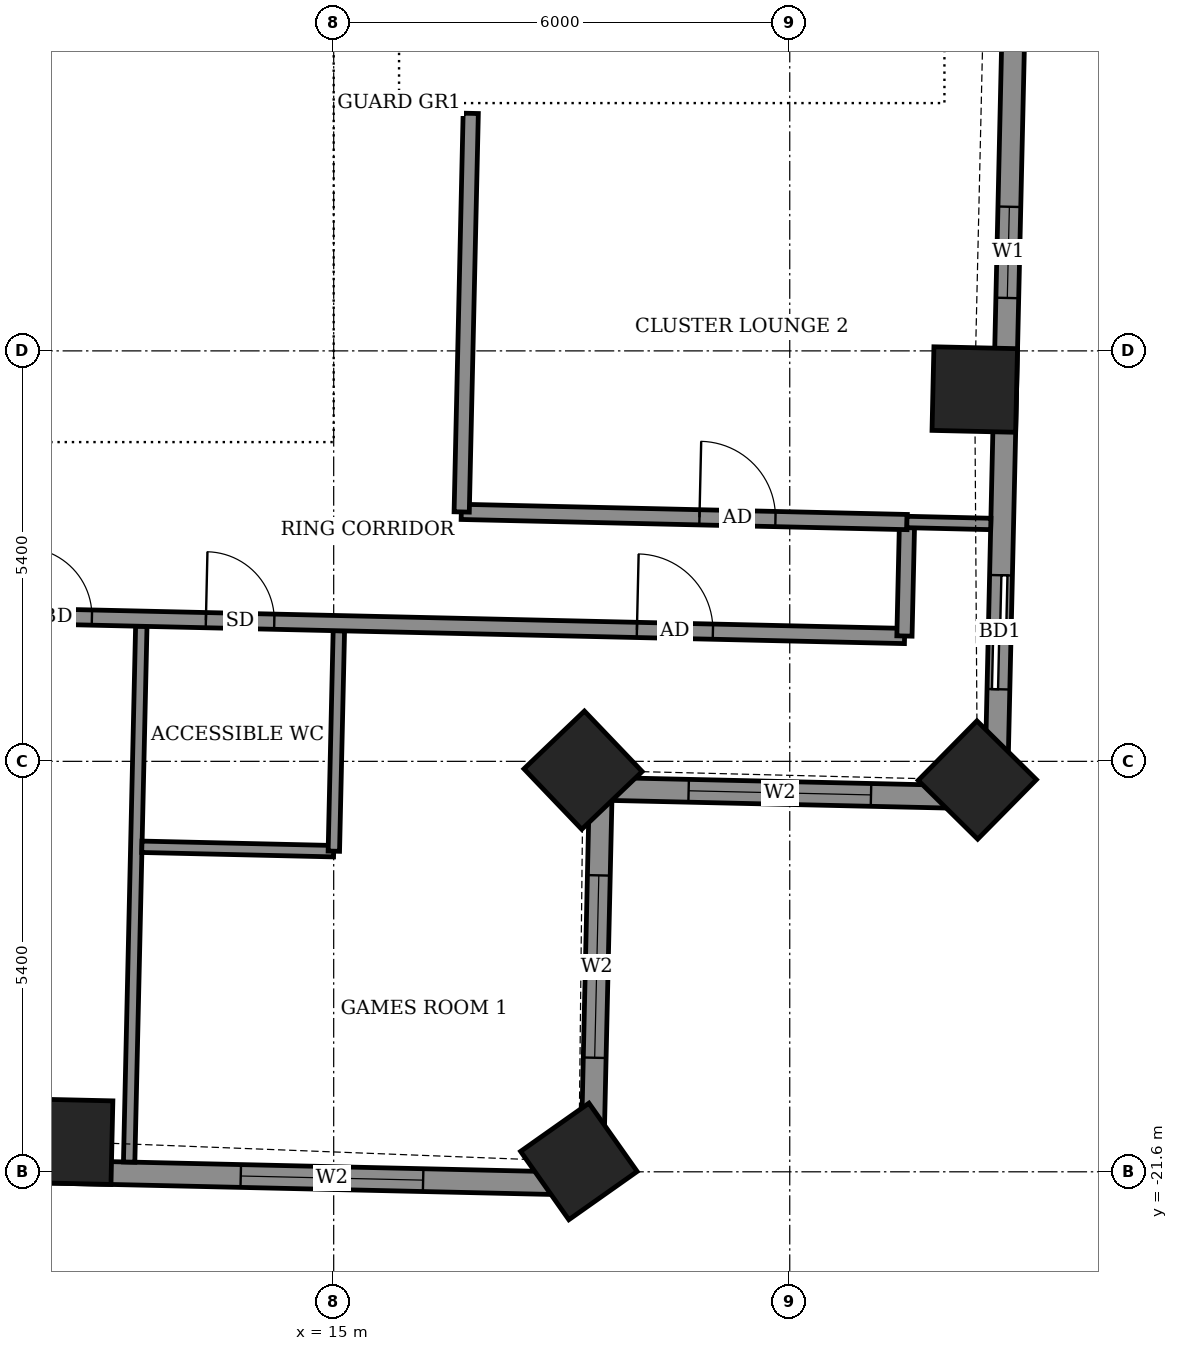
"""IFC4 building model, lengths in metres.
Left out: names, types, materials, properties, quantities, classifications, styles, units other than length and angle.
Written with IfcOpenShell. Run it as: python <this file> out.ifc"""

import sys

from ifc_helpers import new_model, si_unit, direction, frame, frame_2d, origin, origin_2d, place, context, subcontext, project, spatial, rectangle, extrude, element, fill, save


model = new_model("IFC4")
c1 = context("Model", 3, precision=1e-05, world=origin(), true_north=direction((0.0, 1.0)))
c2 = subcontext(c1, "Body", "Model", "MODEL_VIEW")
j1 = project(units=[si_unit("LENGTHUNIT", "METRE"), si_unit("PLANEANGLEUNIT", "RADIAN")], contexts=[c1])
p1 = place(None, origin())
s1 = spatial("IfcSite", under=j1, at=p1, CompositionType="ELEMENT")
p2 = place(p1, origin())
s2 = spatial("IfcBuilding", under=s1, at=p2, CompositionType="ELEMENT")
p3 = place(p2, frame((0.0, 0.0, 212.3)))
s3 = spatial("IfcBuildingStorey", under=s2, at=p3, CompositionType="ELEMENT", Elevation=212.3)
for number, where, z_axis, x_axis in (
    (1, (11.532, -21.204, -0.55), (0.0, 0.0, 1.0), (1.0, -0.023, 0.0)),
    (2, (18.226, -21.464, -0.55), (0.0, 0.0, 1.0), (0.817, 0.577, 0.0)),
    (3, (18.281, -16.316, -0.55), (0.0, 0.0, 1.0), (0.723, 0.691, 0.0)),
    (4, (23.468, -16.446, -0.55), (0.0, 0.0, 1.0), (0.702, 0.712, 0.0)),
    (5, (23.434, -11.309, -0.55), (0.0, 0.0, 1.0), (0.023, 1.0, 0.0)),
):
    element("IfcColumn", number, at=place(p3, frame(where, z_axis=z_axis, x_axis=x_axis)), inside=s3, PredefinedType="COLUMN", context=c2, shape_type="SweptSolid", body=[
        extrude(rectangle(XDim=1.1, YDim=1.1, at=origin_2d()), origin(), (0.0, 0.0, 1.0), 3.6),
    ])
p4 = place(p3, frame((23.713, -16.679, 0.0), z_axis=(0.0, 0.0, 1.0), x_axis=(0.022674801414, 0.999742893639, 0.0)))
e6 = element("IfcWall", 6, at=p4, inside=s3, PredefinedType="SOLIDWALL", context=c2, shape_type="SweptSolid", body=[
    extrude(rectangle(XDim=11.424, YDim=0.3, at=frame_2d((5.712, 0.0))), origin(), (0.0, 0.0, 1.0), 2.55),
])
p5 = place(p4, frame((1.428, 0.0, 0.0)))
e7 = element("IfcOpeningElement", 7, at=p5, cuts=e6, PredefinedType="OPENING", context=c2, shape_type="SweptSolid", body=[
    extrude(rectangle(XDim=1.5, YDim=2.4, at=frame_2d((0.75, 1.2))), frame((0.0, 0.16, 0.0), z_axis=(0.0, -1.0, 0.0), x_axis=(1.0, 0.0, 0.0)), (0.0, 0.0, 1.0), 0.32),
])
p6 = place(p4, frame((6.577, 0.0, 0.9)))
e8 = element("IfcOpeningElement", 8, at=p6, cuts=e6, PredefinedType="OPENING", context=c2, shape_type="SweptSolid", body=[
    extrude(rectangle(XDim=1.2, YDim=1.5, at=frame_2d((0.6, 0.75))), frame((0.0, 0.16, 0.0), z_axis=(0.0, -1.0, 0.0), x_axis=(1.0, 0.0, 0.0)), (0.0, 0.0, 1.0), 0.32),
])
p7 = place(p3, frame((-23.437, -20.81, 0.0), z_axis=(0.0, 0.0, 1.0), x_axis=(0.999742269115, -0.022702320244, 0.0)))
e9 = element("IfcWall", 9, at=p7, inside=s3, PredefinedType="SOLIDWALL", context=c2, shape_type="SweptSolid", body=[
    extrude(rectangle(XDim=41.844, YDim=0.3, at=frame_2d((20.922, 0.0))), origin(), (0.0, 0.0, 1.0), 2.55),
])
p8 = place(p7, frame((1.825, 0.0, 0.0)))
e10 = element("IfcOpeningElement", 10, at=p8, cuts=e9, PredefinedType="OPENING", context=c2, shape_type="SweptSolid", body=[
    extrude(rectangle(XDim=1.5, YDim=2.4, at=frame_2d((0.75, 1.2))), frame((0.0, 0.16, 0.0), z_axis=(0.0, -1.0, 0.0), x_axis=(1.0, 0.0, 0.0)), (0.0, 0.0, 1.0), 0.32),
])
p9 = place(p7, frame((4.937, 0.0, 0.0)))
e11 = element("IfcOpeningElement", 11, at=p9, cuts=e9, PredefinedType="OPENING", context=c2, shape_type="SweptSolid", body=[
    extrude(rectangle(XDim=1.2, YDim=2.4, at=frame_2d((0.6, 1.2))), frame((0.0, 0.16, 0.0), z_axis=(0.0, -1.0, 0.0), x_axis=(1.0, 0.0, 0.0)), (0.0, 0.0, 1.0), 0.32),
])
p10 = place(p7, frame((10.3, 0.0, 0.0)))
e12 = element("IfcOpeningElement", 12, at=p10, cuts=e9, PredefinedType="OPENING", context=c2, shape_type="SweptSolid", body=[
    extrude(rectangle(XDim=1.5, YDim=2.4, at=frame_2d((0.75, 1.2))), frame((0.0, 0.16, 0.0), z_axis=(0.0, -1.0, 0.0), x_axis=(1.0, 0.0, 0.0)), (0.0, 0.0, 1.0), 0.32),
])
p11 = place(p7, frame((15.224, 0.0, 0.0)))
e13 = element("IfcOpeningElement", 13, at=p11, cuts=e9, PredefinedType="OPENING", context=c2, shape_type="SweptSolid", body=[
    extrude(rectangle(XDim=1.5, YDim=2.4, at=frame_2d((0.75, 1.2))), frame((0.0, 0.16, 0.0), z_axis=(0.0, -1.0, 0.0), x_axis=(1.0, 0.0, 0.0)), (0.0, 0.0, 1.0), 0.32),
])
p12 = place(p7, frame((18.436, 0.0, 0.0)))
e14 = element("IfcOpeningElement", 14, at=p12, cuts=e9, PredefinedType="OPENING", context=c2, shape_type="SweptSolid", body=[
    extrude(rectangle(XDim=1.5, YDim=2.4, at=frame_2d((0.75, 1.2))), frame((0.0, 0.16, 0.0), z_axis=(0.0, -1.0, 0.0), x_axis=(1.0, 0.0, 0.0)), (0.0, 0.0, 1.0), 0.32),
])
p13 = place(p7, frame((23.825, 0.0, 0.0)))
e15 = element("IfcOpeningElement", 15, at=p13, cuts=e9, PredefinedType="OPENING", context=c2, shape_type="SweptSolid", body=[
    extrude(rectangle(XDim=1.5, YDim=2.4, at=frame_2d((0.75, 1.2))), frame((0.0, 0.16, 0.0), z_axis=(0.0, -1.0, 0.0), x_axis=(1.0, 0.0, 0.0)), (0.0, 0.0, 1.0), 0.32),
])
p14 = place(p7, frame((28.948, 0.0, 0.0)))
e16 = element("IfcOpeningElement", 16, at=p14, cuts=e9, PredefinedType="OPENING", context=c2, shape_type="SweptSolid", body=[
    extrude(rectangle(XDim=1.5, YDim=2.4, at=frame_2d((0.75, 1.2))), frame((0.0, 0.16, 0.0), z_axis=(0.0, -1.0, 0.0), x_axis=(1.0, 0.0, 0.0)), (0.0, 0.0, 1.0), 0.32),
])
p15 = place(p7, frame((32.16, 0.0, 0.0)))
e17 = element("IfcOpeningElement", 17, at=p15, cuts=e9, PredefinedType="OPENING", context=c2, shape_type="SweptSolid", body=[
    extrude(rectangle(XDim=1.5, YDim=2.4, at=frame_2d((0.75, 1.2))), frame((0.0, 0.16, 0.0), z_axis=(0.0, -1.0, 0.0), x_axis=(1.0, 0.0, 0.0)), (0.0, 0.0, 1.0), 0.32),
])
p16 = place(p7, frame((37.224, 0.0, 0.9)))
e18 = element("IfcOpeningElement", 18, at=p16, cuts=e9, PredefinedType="OPENING", context=c2, shape_type="SweptSolid", body=[
    extrude(rectangle(XDim=2.4, YDim=1.5, at=frame_2d((1.2, 0.75))), frame((0.0, 0.16, 0.0), z_axis=(0.0, -1.0, 0.0), x_axis=(1.0, 0.0, 0.0)), (0.0, 0.0, 1.0), 0.32),
])
p17 = place(p3, frame((18.396, -21.76, 0.0), z_axis=(0.0, 0.0, 1.0), x_axis=(0.022675548694, 0.99974287669, 0.0)))
e19 = element("IfcWall", 19, at=p17, inside=s3, PredefinedType="SOLIDWALL", context=c2, shape_type="SweptSolid", body=[
    extrude(rectangle(XDim=5.2, YDim=0.3, at=frame_2d((2.6, 0.0))), origin(), (0.0, 0.0, 1.0), 2.55),
])
p18 = place(p17, frame((1.661, 0.0, 0.9)))
e20 = element("IfcOpeningElement", 20, at=p18, cuts=e19, PredefinedType="OPENING", context=c2, shape_type="SweptSolid", body=[
    extrude(rectangle(XDim=2.4, YDim=1.5, at=frame_2d((1.2, 0.75))), frame((0.0, 0.16, 0.0), z_axis=(0.0, -1.0, 0.0), x_axis=(1.0, 0.0, 0.0)), (0.0, 0.0, 1.0), 0.32),
])
p19 = place(p3, frame((18.514, -16.561, 0.0), z_axis=(0.0, 0.0, 1.0), x_axis=(0.99974287669, -0.022675548694, 0.0)))
e21 = element("IfcWall", 21, at=p19, inside=s3, PredefinedType="SOLIDWALL", context=c2, shape_type="SweptSolid", body=[
    extrude(rectangle(XDim=5.2, YDim=0.3, at=frame_2d((2.6, 0.0))), origin(), (0.0, 0.0, 1.0), 2.55),
])
p20 = place(p19, frame((1.156, 0.0, 0.9)))
e22 = element("IfcOpeningElement", 22, at=p20, cuts=e21, PredefinedType="OPENING", context=c2, shape_type="SweptSolid", body=[
    extrude(rectangle(XDim=2.4, YDim=1.5, at=frame_2d((1.2, 0.75))), frame((0.0, 0.16, 0.0), z_axis=(0.0, -1.0, 0.0), x_axis=(1.0, 0.0, 0.0)), (0.0, 0.0, 1.0), 0.32),
])
p21 = place(p3, frame((12.309, -21.472, 0.0), z_axis=(0.0, 0.0, 1.0), x_axis=(0.022680503969, 0.999742764285, 0.0)))
e23 = element("IfcWall", 23, at=p21, inside=s3, PredefinedType="PARTITIONING", context=c2, shape_type="SweptSolid", body=[
    extrude(rectangle(XDim=7.051, YDim=0.15, at=frame_2d((3.525, 0.0))), origin(), (0.0, 0.0, 1.0), 2.55),
])
p22 = place(p3, frame((12.476, -17.324, 0.0), z_axis=(0.0, 0.0, 1.0), x_axis=(0.999735102249, -0.023015762656, 0.0)))
e24 = element("IfcWall", 24, at=p22, inside=s3, PredefinedType="PARTITIONING", context=c2, shape_type="SweptSolid", body=[
    extrude(rectangle(XDim=2.525, YDim=0.15, at=frame_2d((1.262, 0.0))), origin(), (0.0, 0.0, 1.0), 3.05),
])
p23 = place(p3, frame((15.002, -17.382, 0.0), z_axis=(0.0, 0.0, 1.0), x_axis=(0.022807433839, 0.999739876649, 0.0)))
e25 = element("IfcWall", 25, at=p23, inside=s3, PredefinedType="PARTITIONING", context=c2, shape_type="SweptSolid", body=[
    extrude(rectangle(XDim=2.901, YDim=0.15, at=frame_2d((1.45, 0.0))), origin(), (0.0, 0.0, 1.0), 3.05),
])
p24 = place(p3, frame((-26.421, -13.441, 0.0), z_axis=(0.0, 0.0, 1.0), x_axis=(0.999742754064, -0.022680954485, 0.0)))
e26 = element("IfcWall", 26, at=p24, inside=s3, PredefinedType="PARTITIONING", context=c2, shape_type="SweptSolid", body=[
    extrude(rectangle(XDim=48.945, YDim=0.2, at=frame_2d((24.472, 0.0))), origin(), (0.0, 0.0, 1.0), 3.05),
])
p25 = place(p24, frame((1.425, 0.0, 0.0)))
e27 = element("IfcOpeningElement", 27, at=p25, cuts=e26, PredefinedType="OPENING", context=c2, shape_type="SweptSolid", body=[
    extrude(rectangle(XDim=1.0, YDim=2.1, at=frame_2d((0.5, 1.05))), frame((0.0, 0.11, 0.0), z_axis=(0.0, -1.0, 0.0), x_axis=(1.0, 0.0, 0.0)), (0.0, 0.0, 1.0), 0.22),
])
p26 = place(p24, frame((6.0, 0.0, 0.0)))
e28 = element("IfcOpeningElement", 28, at=p26, cuts=e26, PredefinedType="OPENING", context=c2, shape_type="SweptSolid", body=[
    extrude(rectangle(XDim=0.9, YDim=2.1, at=frame_2d((0.45, 1.05))), frame((0.0, 0.11, 0.0), z_axis=(0.0, -1.0, 0.0), x_axis=(1.0, 0.0, 0.0)), (0.0, 0.0, 1.0), 0.22),
])
p27 = place(p24, frame((10.55, 0.0, 0.0)))
e29 = element("IfcOpeningElement", 29, at=p27, cuts=e26, PredefinedType="OPENING", context=c2, shape_type="SweptSolid", body=[
    extrude(rectangle(XDim=0.9, YDim=2.1, at=frame_2d((0.45, 1.05))), frame((0.0, 0.11, 0.0), z_axis=(0.0, -1.0, 0.0), x_axis=(1.0, 0.0, 0.0)), (0.0, 0.0, 1.0), 0.22),
])
p28 = place(p24, frame((12.55, 0.0, 0.0)))
e30 = element("IfcOpeningElement", 30, at=p28, cuts=e26, PredefinedType="OPENING", context=c2, shape_type="SweptSolid", body=[
    extrude(rectangle(XDim=0.9, YDim=2.1, at=frame_2d((0.45, 1.05))), frame((0.0, 0.11, 0.0), z_axis=(0.0, -1.0, 0.0), x_axis=(1.0, 0.0, 0.0)), (0.0, 0.0, 1.0), 0.22),
])
p29 = place(p24, frame((19.425, 0.0, 0.0)))
e31 = element("IfcOpeningElement", 31, at=p29, cuts=e26, PredefinedType="OPENING", context=c2, shape_type="SweptSolid", body=[
    extrude(rectangle(XDim=0.9, YDim=2.1, at=frame_2d((0.45, 1.05))), frame((0.0, 0.11, 0.0), z_axis=(0.0, -1.0, 0.0), x_axis=(1.0, 0.0, 0.0)), (0.0, 0.0, 1.0), 0.22),
])
p30 = place(p24, frame((21.525, 0.0, 0.0)))
e32 = element("IfcOpeningElement", 32, at=p30, cuts=e26, PredefinedType="OPENING", context=c2, shape_type="SweptSolid", body=[
    extrude(rectangle(XDim=0.9, YDim=2.1, at=frame_2d((0.45, 1.05))), frame((0.0, 0.11, 0.0), z_axis=(0.0, -1.0, 0.0), x_axis=(1.0, 0.0, 0.0)), (0.0, 0.0, 1.0), 0.22),
])
p31 = place(p24, frame((28.475, 0.0, 0.0)))
e33 = element("IfcOpeningElement", 33, at=p31, cuts=e26, PredefinedType="OPENING", context=c2, shape_type="SweptSolid", body=[
    extrude(rectangle(XDim=0.9, YDim=2.1, at=frame_2d((0.45, 1.05))), frame((0.0, 0.11, 0.0), z_axis=(0.0, -1.0, 0.0), x_axis=(1.0, 0.0, 0.0)), (0.0, 0.0, 1.0), 0.22),
])
p32 = place(p24, frame((30.5, 0.0, 0.0)))
e34 = element("IfcOpeningElement", 34, at=p32, cuts=e26, PredefinedType="OPENING", context=c2, shape_type="SweptSolid", body=[
    extrude(rectangle(XDim=0.9, YDim=2.1, at=frame_2d((0.45, 1.05))), frame((0.0, 0.11, 0.0), z_axis=(0.0, -1.0, 0.0), x_axis=(1.0, 0.0, 0.0)), (0.0, 0.0, 1.0), 0.22),
])
p33 = place(p24, frame((37.35, 0.0, 0.0)))
e35 = element("IfcOpeningElement", 35, at=p33, cuts=e26, PredefinedType="OPENING", context=c2, shape_type="SweptSolid", body=[
    extrude(rectangle(XDim=0.9, YDim=2.1, at=frame_2d((0.45, 1.05))), frame((0.0, 0.11, 0.0), z_axis=(0.0, -1.0, 0.0), x_axis=(1.0, 0.0, 0.0)), (0.0, 0.0, 1.0), 0.22),
])
p34 = place(p24, frame((45.422, 0.0, 0.0)))
e36 = element("IfcOpeningElement", 36, at=p34, cuts=e26, PredefinedType="OPENING", context=c2, shape_type="SweptSolid", body=[
    extrude(rectangle(XDim=1.0, YDim=2.1, at=frame_2d((0.5, 1.05))), frame((0.0, 0.11, 0.0), z_axis=(0.0, -1.0, 0.0), x_axis=(1.0, 0.0, 0.0)), (0.0, 0.0, 1.0), 0.22),
])
p35 = place(p24, frame((39.75, 0.0, 0.0)))
e37 = element("IfcOpeningElement", 37, at=p35, cuts=e26, PredefinedType="OPENING", context=c2, shape_type="SweptSolid", body=[
    extrude(rectangle(XDim=0.9, YDim=2.1, at=frame_2d((0.45, 1.05))), frame((0.0, 0.11, 0.0), z_axis=(0.0, -1.0, 0.0), x_axis=(1.0, 0.0, 0.0)), (0.0, 0.0, 1.0), 0.22),
])
p36 = place(p3, frame((22.509, -14.551, 0.0), z_axis=(0.0, 0.0, 1.0), x_axis=(0.022632637625, 0.99974384905, 0.0)))
e38 = element("IfcWall", 38, at=p36, inside=s3, PredefinedType="PARTITIONING", context=c2, shape_type="SweptSolid", body=[
    extrude(rectangle(XDim=1.5, YDim=0.2, at=frame_2d((0.75, 0.0))), origin(), (0.0, 0.0, 1.0), 3.05),
])
p37 = place(p3, frame((16.679, -12.918, 0.0), z_axis=(0.0, 0.0, 1.0), x_axis=(0.999739057042, -0.022843332181, 0.0)))
e39 = element("IfcWall", 39, at=p37, inside=s3, PredefinedType="PARTITIONING", context=c2, shape_type="SweptSolid", body=[
    extrude(rectangle(XDim=5.867, YDim=0.2, at=frame_2d((2.934, 0.0))), origin(), (0.0, 0.0, 1.0), 3.05),
])
p38 = place(p37, frame((3.134, 0.0, 0.0)))
e40 = element("IfcOpeningElement", 40, at=p38, cuts=e39, PredefinedType="OPENING", context=c2, shape_type="SweptSolid", body=[
    extrude(rectangle(XDim=1.0, YDim=2.1, at=frame_2d((0.5, 1.05))), frame((0.0, 0.11, 0.0), z_axis=(0.0, -1.0, 0.0), x_axis=(1.0, 0.0, 0.0)), (0.0, 0.0, 1.0), 0.22),
])
p39 = place(p3, frame((16.684, -12.919, 0.0), z_axis=(0.0, 0.0, 1.0), x_axis=(0.022667483124, 0.999743059595, 0.0)))
e41 = element("IfcWall", 41, at=p39, inside=s3, PredefinedType="PARTITIONING", context=c2, shape_type="SweptSolid", body=[
    extrude(rectangle(XDim=5.245, YDim=0.2, at=frame_2d((2.623, 0.0))), origin(), (0.0, 0.0, 1.0), 3.05),
])
p40 = place(p3, frame((22.541, -13.051, 0.0), z_axis=(0.0, 0.0, 1.0), x_axis=(0.999725373977, -0.023434517833, 0.0)))
e42 = element("IfcWall", 42, at=p40, inside=s3, PredefinedType="PARTITIONING", context=c2, shape_type="SweptSolid", body=[
    extrude(rectangle(XDim=1.104, YDim=0.15, at=frame_2d((0.552, 0.0))), origin(), (0.0, 0.0, 1.0), 2.55),
])
p41 = place(p3, frame((-14.6, -11.2, 0.0), z_axis=(0.0, 0.0, 1.0), x_axis=(1.0, 0.0, 0.0)))
e43 = element("IfcWall", 43, at=p41, inside=s3, PredefinedType="SHEAR", context=c2, shape_type="SweptSolid", body=[
    extrude(rectangle(XDim=29.2, YDim=0.8, at=frame_2d((14.6, 0.0))), origin(), (0.0, 0.0, 1.0), 3.6),
])
p42 = place(p3, frame((14.2, -10.8, 0.0), z_axis=(0.0, 0.0, 1.0), x_axis=(0.0, 1.0, 0.0)))
e44 = element("IfcWall", 44, at=p42, inside=s3, PredefinedType="SHEAR", context=c2, shape_type="SweptSolid", body=[
    extrude(rectangle(XDim=21.6, YDim=0.8, at=frame_2d((10.8, 0.0))), origin(), (0.0, 0.0, 1.0), 3.6),
])
p43 = place(p42, frame((1.2, 0.0, 0.0)))
e45 = element("IfcOpeningElement", 45, at=p43, cuts=e44, PredefinedType="OPENING", context=c2, shape_type="SweptSolid", body=[
    extrude(rectangle(XDim=1.2, YDim=2.1, at=frame_2d((0.6, 1.05))), frame((0.0, 0.41, 0.0), z_axis=(0.0, -1.0, 0.0), x_axis=(1.0, 0.0, 0.0)), (0.0, 0.0, 1.0), 0.82),
])
p44 = place(p5, origin())
e46 = element("IfcDoor", 46, at=p44, inside=s3, OperationType="SLIDING_TO_LEFT", PredefinedType="DOOR", context=c2, shape_type="SweptSolid", body=[
    extrude(rectangle(XDim=1.5, YDim=2.4, at=frame_2d((0.75, 1.2))), frame((0.0, 0.025, 0.0), z_axis=(0.0, -1.0, 0.0), x_axis=(1.0, 0.0, 0.0)), (0.0, 0.0, 1.0), 0.05),
])
fill(e7, e46)
p45 = place(p6, origin())
e47 = element("IfcWindow", 47, at=p45, inside=s3, PartitioningType="SINGLE_PANEL", PredefinedType="WINDOW", context=c2, shape_type="SweptSolid", body=[
    extrude(rectangle(XDim=1.2, YDim=1.5, at=frame_2d((0.6, 0.75))), frame((0.0, 0.03, 0.0), z_axis=(0.0, -1.0, 0.0), x_axis=(1.0, 0.0, 0.0)), (0.0, 0.0, 1.0), 0.06),
])
fill(e8, e47)
p46 = place(p16, origin())
e48 = element("IfcWindow", 48, at=p46, inside=s3, PartitioningType="DOUBLE_PANEL_VERTICAL", PredefinedType="WINDOW", context=c2, shape_type="SweptSolid", body=[
    extrude(rectangle(XDim=2.4, YDim=1.5, at=frame_2d((1.2, 0.75))), frame((0.0, 0.03, 0.0), z_axis=(0.0, -1.0, 0.0), x_axis=(1.0, 0.0, 0.0)), (0.0, 0.0, 1.0), 0.06),
])
fill(e18, e48)
p47 = place(p18, origin())
e49 = element("IfcWindow", 49, at=p47, inside=s3, PartitioningType="DOUBLE_PANEL_VERTICAL", PredefinedType="WINDOW", context=c2, shape_type="SweptSolid", body=[
    extrude(rectangle(XDim=2.4, YDim=1.5, at=frame_2d((1.2, 0.75))), frame((0.0, 0.03, 0.0), z_axis=(0.0, -1.0, 0.0), x_axis=(1.0, 0.0, 0.0)), (0.0, 0.0, 1.0), 0.06),
])
fill(e20, e49)
p48 = place(p20, origin())
e50 = element("IfcWindow", 50, at=p48, inside=s3, PartitioningType="DOUBLE_PANEL_VERTICAL", PredefinedType="WINDOW", context=c2, shape_type="SweptSolid", body=[
    extrude(rectangle(XDim=2.4, YDim=1.5, at=frame_2d((1.2, 0.75))), frame((0.0, 0.03, 0.0), z_axis=(0.0, -1.0, 0.0), x_axis=(1.0, 0.0, 0.0)), (0.0, 0.0, 1.0), 0.06),
])
fill(e22, e50)
p49 = place(p33, origin())
e51 = element("IfcDoor", 51, at=p49, inside=s3, OperationType="SINGLE_SWING_LEFT", PredefinedType="DOOR", context=c2, shape_type="SweptSolid", body=[
    extrude(rectangle(XDim=0.9, YDim=2.1, at=frame_2d((0.45, 1.05))), frame((0.0, 0.025, 0.0), z_axis=(0.0, -1.0, 0.0), x_axis=(1.0, 0.0, 0.0)), (0.0, 0.0, 1.0), 0.05),
])
fill(e35, e51)
p50 = place(p34, origin())
e52 = element("IfcDoor", 52, at=p50, inside=s3, OperationType="SINGLE_SWING_RIGHT", PredefinedType="DOOR", context=c2, shape_type="SweptSolid", body=[
    extrude(rectangle(XDim=1.0, YDim=2.1, at=frame_2d((0.5, 1.05))), frame((0.0, 0.025, 0.0), z_axis=(0.0, -1.0, 0.0), x_axis=(1.0, 0.0, 0.0)), (0.0, 0.0, 1.0), 0.05),
])
fill(e36, e52)
p51 = place(p35, origin())
e53 = element("IfcDoor", 53, at=p51, inside=s3, OperationType="SINGLE_SWING_RIGHT", PredefinedType="DOOR", context=c2, shape_type="SweptSolid", body=[
    extrude(rectangle(XDim=0.9, YDim=2.1, at=frame_2d((0.45, 1.05))), frame((0.0, 0.025, 0.0), z_axis=(0.0, -1.0, 0.0), x_axis=(1.0, 0.0, 0.0)), (0.0, 0.0, 1.0), 0.05),
])
fill(e37, e53)
p52 = place(p38, origin())
e54 = element("IfcDoor", 54, at=p52, inside=s3, OperationType="SINGLE_SWING_LEFT", PredefinedType="DOOR", context=c2, shape_type="SweptSolid", body=[
    extrude(rectangle(XDim=1.0, YDim=2.1, at=frame_2d((0.5, 1.05))), frame((0.0, 0.025, 0.0), z_axis=(0.0, -1.0, 0.0), x_axis=(1.0, 0.0, 0.0)), (0.0, 0.0, 1.0), 0.05),
])
fill(e40, e54)
p53 = place(p43, origin())
e55 = element("IfcDoor", 55, at=p53, inside=s3, OperationType="DOUBLE_DOOR_SINGLE_SWING", PredefinedType="DOOR", context=c2, shape_type="SweptSolid", body=[
    extrude(rectangle(XDim=1.2, YDim=2.1, at=frame_2d((0.6, 1.05))), frame((0.0, 0.025, 0.0), z_axis=(0.0, -1.0, 0.0), x_axis=(1.0, 0.0, 0.0)), (0.0, 0.0, 1.0), 0.05),
])
fill(e45, e55)
save(model, sys.argv[1])
